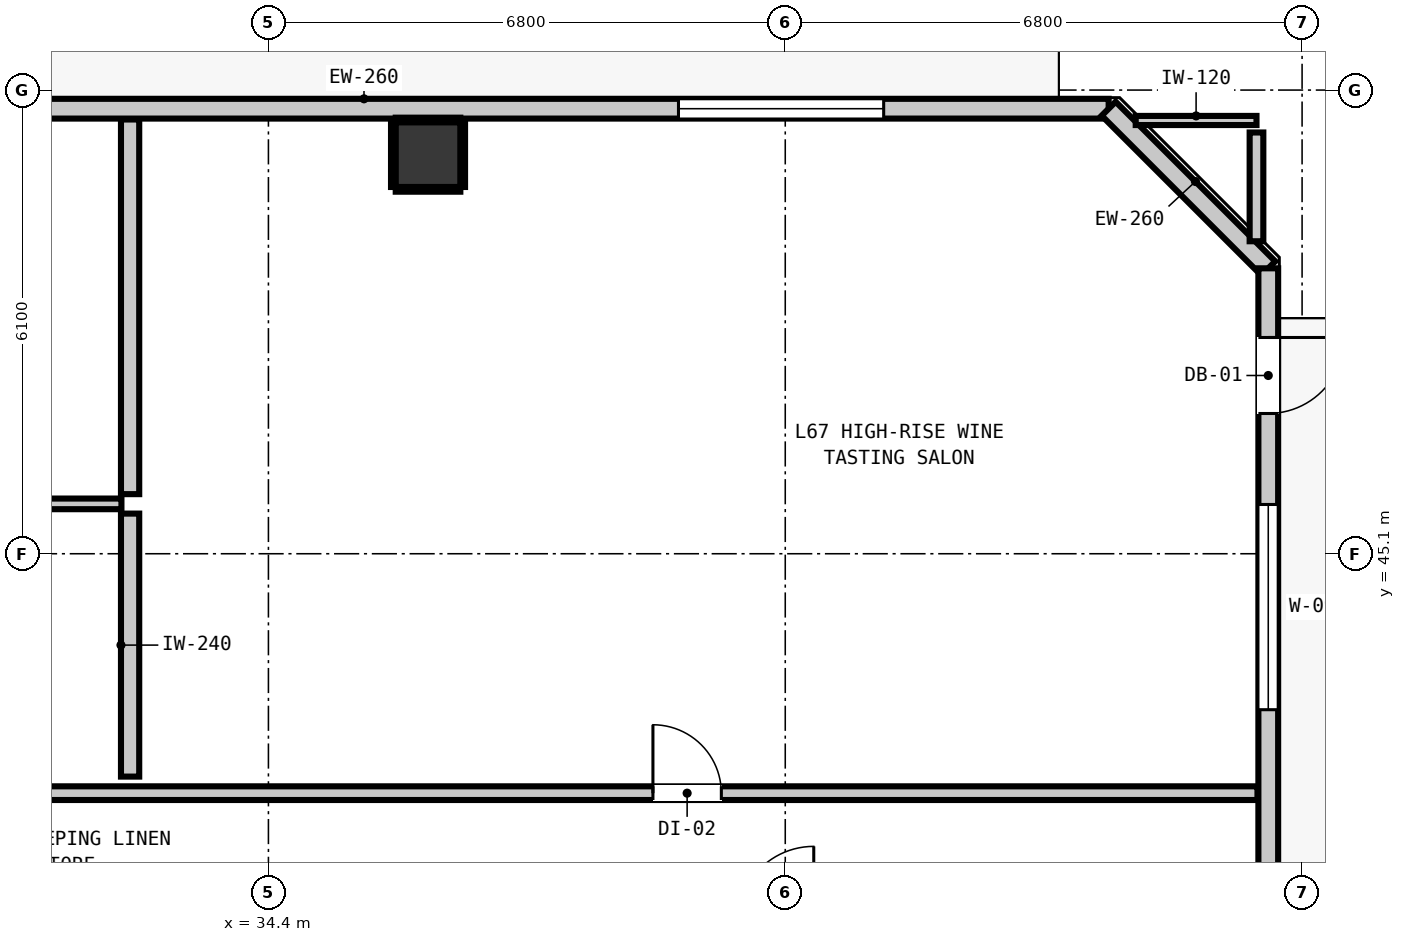
"""IFC4 building model, lengths in metres.
Left out: names, types, materials, properties, quantities, classifications, styles, units other than length and angle.
Written with IfcOpenShell. Run it as: python <this file> out.ifc"""

import sys

from ifc_helpers import new_model, si_unit, direction, frame, frame_2d, origin, origin_2d, place, context, subcontext, project, spatial, rectangle, extrude, element, fill, save


model = new_model("IFC4")
c1 = context("Model", 3, precision=1e-05, world=origin(), true_north=direction((0.0, 1.0)))
c2 = subcontext(c1, "Body", "Model", "MODEL_VIEW")
j1 = project(units=[si_unit("LENGTHUNIT", "METRE"), si_unit("PLANEANGLEUNIT", "RADIAN")], contexts=[c1])
p1 = place(None, origin())
s1 = spatial("IfcSite", under=j1, at=p1, CompositionType="ELEMENT")
p2 = place(p1, origin())
s2 = spatial("IfcBuilding", under=s1, at=p2, CompositionType="ELEMENT")
p3 = place(p2, frame((0.0, 0.0, 231.28)))
s3 = spatial("IfcBuildingStorey", under=s2, at=p3, CompositionType="ELEMENT", Elevation=231.28)
p4 = place(p3, frame((36.5, 50.35, -0.2), z_axis=(0.0, 0.0, 1.0), x_axis=(1.0, 0.0, 0.0)))
e1 = element("IfcColumn", 1, at=p4, inside=s3, PredefinedType="COLUMN", context=c2, shape_type="SweptSolid", body=[
    extrude(rectangle(XDim=0.85, YDim=0.85, at=origin_2d()), origin(), (0.0, 0.0, 1.0), 3.52),
])
p5 = place(p3, frame((12.745, 50.955, 0.0), z_axis=(0.0, 0.0, 1.0), x_axis=(1.0, 0.0, 0.0)))
e2 = element("IfcWall", 2, at=p5, inside=s3, PredefinedType="STANDARD", context=c2, shape_type="SweptSolid", body=[
    extrude(rectangle(XDim=32.71, YDim=0.26, at=frame_2d((16.355, 0.0))), origin(), (0.0, 0.0, 1.0), 3.1),
])
p6 = place(p5, frame((1.61, 0.0, 0.0)))
e3 = element("IfcOpeningElement", 3, at=p6, cuts=e2, PredefinedType="OPENING", context=c2, shape_type="SweptSolid", body=[
    extrude(rectangle(XDim=1.0, YDim=2.15, at=frame_2d((0.5, 1.075))), frame((0.0, 0.14, 0.0), z_axis=(0.0, -1.0, 0.0), x_axis=(1.0, 0.0, 0.0)), (0.0, 0.0, 1.0), 0.28),
])
p7 = place(p5, frame((4.034, 0.0, 0.85)))
e4 = element("IfcOpeningElement", 4, at=p7, cuts=e2, PredefinedType="OPENING", context=c2, shape_type="SweptSolid", body=[
    extrude(rectangle(XDim=2.7, YDim=2.0, at=frame_2d((1.35, 1.0))), frame((0.0, 0.14, 0.0), z_axis=(0.0, -1.0, 0.0), x_axis=(1.0, 0.0, 0.0)), (0.0, 0.0, 1.0), 0.28),
])
p8 = place(p5, frame((10.905, 0.0, 0.85)))
e5 = element("IfcOpeningElement", 5, at=p8, cuts=e2, PredefinedType="OPENING", context=c2, shape_type="SweptSolid", body=[
    extrude(rectangle(XDim=2.7, YDim=2.0, at=frame_2d((1.35, 1.0))), frame((0.0, 0.14, 0.0), z_axis=(0.0, -1.0, 0.0), x_axis=(1.0, 0.0, 0.0)), (0.0, 0.0, 1.0), 0.28),
])
p9 = place(p5, frame((17.725, 0.0, 0.85)))
e6 = element("IfcOpeningElement", 6, at=p9, cuts=e2, PredefinedType="OPENING", context=c2, shape_type="SweptSolid", body=[
    extrude(rectangle(XDim=1.05, YDim=1.65, at=frame_2d((0.525, 0.825))), frame((0.0, 0.14, 0.0), z_axis=(0.0, -1.0, 0.0), x_axis=(1.0, 0.0, 0.0)), (0.0, 0.0, 1.0), 0.28),
])
p10 = place(p5, frame((27.05, 0.0, 0.85)))
e7 = element("IfcOpeningElement", 7, at=p10, cuts=e2, PredefinedType="OPENING", context=c2, shape_type="SweptSolid", body=[
    extrude(rectangle(XDim=2.7, YDim=2.0, at=frame_2d((1.35, 1.0))), frame((0.0, 0.14, 0.0), z_axis=(0.0, -1.0, 0.0), x_axis=(1.0, 0.0, 0.0)), (0.0, 0.0, 1.0), 0.28),
])
p11 = place(p3, frame((45.455, 50.955, 0.0), z_axis=(0.0, 0.0, 1.0), x_axis=(0.707065676302, -0.707147883682, 0.0)))
e8 = element("IfcWall", 8, at=p11, inside=s3, PredefinedType="STANDARD", context=c2, shape_type="SweptSolid", body=[
    extrude(rectangle(XDim=2.97, YDim=0.26, at=frame_2d((1.485, 0.0))), origin(), (0.0, 0.0, 1.0), 3.1),
])
p12 = place(p3, frame((47.555, 48.855, 0.0), z_axis=(0.0, 0.0, 1.0), x_axis=(0.0, -1.0, 0.0)))
e9 = element("IfcWall", 9, at=p12, inside=s3, PredefinedType="STANDARD", context=c2, shape_type="SweptSolid", body=[
    extrude(rectangle(XDim=30.31, YDim=0.26, at=frame_2d((15.155, 0.0))), origin(), (0.0, 0.0, 1.0), 3.1),
])
p13 = place(p12, frame((0.91, 0.0, 0.0)))
e10 = element("IfcOpeningElement", 10, at=p13, cuts=e9, PredefinedType="OPENING", context=c2, shape_type="SweptSolid", body=[
    extrude(rectangle(XDim=1.0, YDim=2.15, at=frame_2d((0.5, 1.075))), frame((0.0, 0.14, 0.0), z_axis=(0.0, -1.0, 0.0), x_axis=(1.0, 0.0, 0.0)), (0.0, 0.0, 1.0), 0.28),
])
p14 = place(p12, frame((3.107, 0.0, 0.85)))
e11 = element("IfcOpeningElement", 11, at=p14, cuts=e9, PredefinedType="OPENING", context=c2, shape_type="SweptSolid", body=[
    extrude(rectangle(XDim=2.7, YDim=2.0, at=frame_2d((1.35, 1.0))), frame((0.0, 0.14, 0.0), z_axis=(0.0, -1.0, 0.0), x_axis=(1.0, 0.0, 0.0)), (0.0, 0.0, 1.0), 0.28),
])
p15 = place(p3, frame((10.787, 41.95, 0.0), z_axis=(0.0, 0.0, 1.0), x_axis=(1.0, 0.0, 0.0)))
e12 = element("IfcWall", 12, at=p15, inside=s3, PredefinedType="PARTITIONING", context=c2, shape_type="SweptSolid", body=[
    extrude(rectangle(XDim=36.626, YDim=0.18, at=frame_2d((18.313, 0.0))), origin(), (0.0, 0.0, 1.0), 3.1),
])
p16 = place(p15, frame((7.795, 0.0, 0.0)))
e13 = element("IfcOpeningElement", 13, at=p16, cuts=e12, PredefinedType="OPENING", context=c2, shape_type="SweptSolid", body=[
    extrude(rectangle(XDim=1.0, YDim=2.15, at=frame_2d((0.5, 1.075))), frame((0.0, 0.1, 0.0), z_axis=(0.0, -1.0, 0.0), x_axis=(1.0, 0.0, 0.0)), (0.0, 0.0, 1.0), 0.2),
])
p17 = place(p15, frame((28.672, 0.0, 0.0)))
e14 = element("IfcOpeningElement", 14, at=p17, cuts=e12, PredefinedType="OPENING", context=c2, shape_type="SweptSolid", body=[
    extrude(rectangle(XDim=0.9, YDim=2.1, at=frame_2d((0.45, 1.05))), frame((0.0, 0.1, 0.0), z_axis=(0.0, -1.0, 0.0), x_axis=(1.0, 0.0, 0.0)), (0.0, 0.0, 1.0), 0.2),
])
p18 = place(p3, frame((22.38, 45.756, 0.0), z_axis=(0.0, 0.0, 1.0), x_axis=(1.0, 0.0, 0.0)))
e15 = element("IfcWall", 15, at=p18, inside=s3, PredefinedType="PARTITIONING", context=c2, shape_type="SweptSolid", body=[
    extrude(rectangle(XDim=10.086, YDim=0.14, at=frame_2d((5.043, 0.0))), origin(), (0.0, 0.0, 1.0), 3.1),
])
p19 = place(p3, frame((45.811, 50.8, 0.0), z_axis=(0.0, 0.0, 1.0), x_axis=(1.0, 0.0, 0.0)))
e16 = element("IfcWall", 16, at=p19, inside=s3, PredefinedType="PARTITIONING", context=c2, shape_type="SweptSolid", body=[
    extrude(rectangle(XDim=1.589, YDim=0.12, at=frame_2d((0.794, 0.0))), origin(), (0.0, 0.0, 1.0), 3.1),
])
p20 = place(p3, frame((32.58, 42.168, 0.0), z_axis=(0.0, 0.0, 1.0), x_axis=(0.0, 1.0, 0.0)))
e17 = element("IfcWall", 17, at=p20, inside=s3, PredefinedType="PARTITIONING", context=c2, shape_type="SweptSolid", body=[
    extrude(rectangle(XDim=3.46, YDim=0.24, at=frame_2d((1.73, 0.0))), origin(), (0.0, 0.0, 1.0), 3.1),
])
p21 = place(p3, frame((32.58, 45.884, 0.0), z_axis=(0.0, 0.0, 1.0), x_axis=(0.0, 1.0, 0.0)))
e18 = element("IfcWall", 18, at=p21, inside=s3, PredefinedType="PARTITIONING", context=c2, shape_type="SweptSolid", body=[
    extrude(rectangle(XDim=4.929, YDim=0.24, at=frame_2d((2.464, 0.0))), origin(), (0.0, 0.0, 1.0), 3.1),
])
p22 = place(p3, frame((47.4, 49.211, 0.0), z_axis=(0.0, 0.0, 1.0), x_axis=(0.0, 1.0, 0.0)))
e19 = element("IfcWall", 19, at=p22, inside=s3, PredefinedType="PARTITIONING", context=c2, shape_type="SweptSolid", body=[
    extrude(rectangle(XDim=1.431, YDim=0.18, at=frame_2d((0.716, 0.0))), origin(), (0.0, 0.0, 1.0), 3.1),
])
for number, where, z_axis, x_axis in (
    (20, (36.075, 49.893, 0.0), (0.0, 0.0, 1.0), (1.0, 0.0, 0.0)),
    (21, (36.075, 50.807, 0.0), (0.0, 0.0, 1.0), (1.0, 0.0, 0.0)),
):
    element("IfcWall", number, at=place(p3, frame(where, z_axis=z_axis, x_axis=x_axis)), inside=s3, PredefinedType="PARTITIONING", context=c2, shape_type="SweptSolid", body=[
        extrude(rectangle(XDim=0.85, YDim=0.06, at=frame_2d((0.425, 0.0))), origin(), (0.0, 0.0, 1.0), 1.45),
    ])
for number, where, z_axis, x_axis in (
    (22, (36.043, 49.925, 0.0), (0.0, 0.0, 1.0), (0.0, 1.0, 0.0)),
    (23, (36.957, 49.925, 0.0), (0.0, 0.0, 1.0), (0.0, 1.0, 0.0)),
):
    element("IfcWall", number, at=place(p3, frame(where, z_axis=z_axis, x_axis=x_axis)), inside=s3, PredefinedType="PARTITIONING", context=c2, shape_type="SweptSolid", body=[
        extrude(rectangle(XDim=0.85, YDim=0.06, at=frame_2d((0.425, 0.0))), origin(), (0.0, 0.0, 1.0), 1.45),
    ])
p23 = place(p13, origin())
e24 = element("IfcDoor", 24, at=p23, inside=s3, OperationType="SINGLE_SWING_LEFT", PredefinedType="DOOR", context=c2, shape_type="SweptSolid", body=[
    extrude(rectangle(XDim=1.0, YDim=2.15, at=frame_2d((0.5, 1.075))), frame((0.0, 0.025, 0.0), z_axis=(0.0, -1.0, 0.0), x_axis=(1.0, 0.0, 0.0)), (0.0, 0.0, 1.0), 0.05),
])
fill(e10, e24)
p24 = place(p10, origin())
e25 = element("IfcWindow", 25, at=p24, inside=s3, PartitioningType="SINGLE_PANEL", PredefinedType="WINDOW", context=c2, shape_type="SweptSolid", body=[
    extrude(rectangle(XDim=2.7, YDim=2.0, at=frame_2d((1.35, 1.0))), frame((0.0, 0.03, 0.0), z_axis=(0.0, -1.0, 0.0), x_axis=(1.0, 0.0, 0.0)), (0.0, 0.0, 1.0), 0.06),
])
fill(e7, e25)
p25 = place(p14, origin())
e26 = element("IfcWindow", 26, at=p25, inside=s3, PartitioningType="SINGLE_PANEL", PredefinedType="WINDOW", context=c2, shape_type="SweptSolid", body=[
    extrude(rectangle(XDim=2.7, YDim=2.0, at=frame_2d((1.35, 1.0))), frame((0.0, 0.03, 0.0), z_axis=(0.0, -1.0, 0.0), x_axis=(1.0, 0.0, 0.0)), (0.0, 0.0, 1.0), 0.06),
])
fill(e11, e26)
p26 = place(p17, origin())
e27 = element("IfcDoor", 27, at=p26, inside=s3, OperationType="SINGLE_SWING_LEFT", PredefinedType="DOOR", context=c2, shape_type="SweptSolid", body=[
    extrude(rectangle(XDim=0.9, YDim=2.1, at=frame_2d((0.45, 1.05))), frame((0.0, 0.025, 0.0), z_axis=(0.0, -1.0, 0.0), x_axis=(1.0, 0.0, 0.0)), (0.0, 0.0, 1.0), 0.05),
])
fill(e14, e27)
save(model, sys.argv[1])
